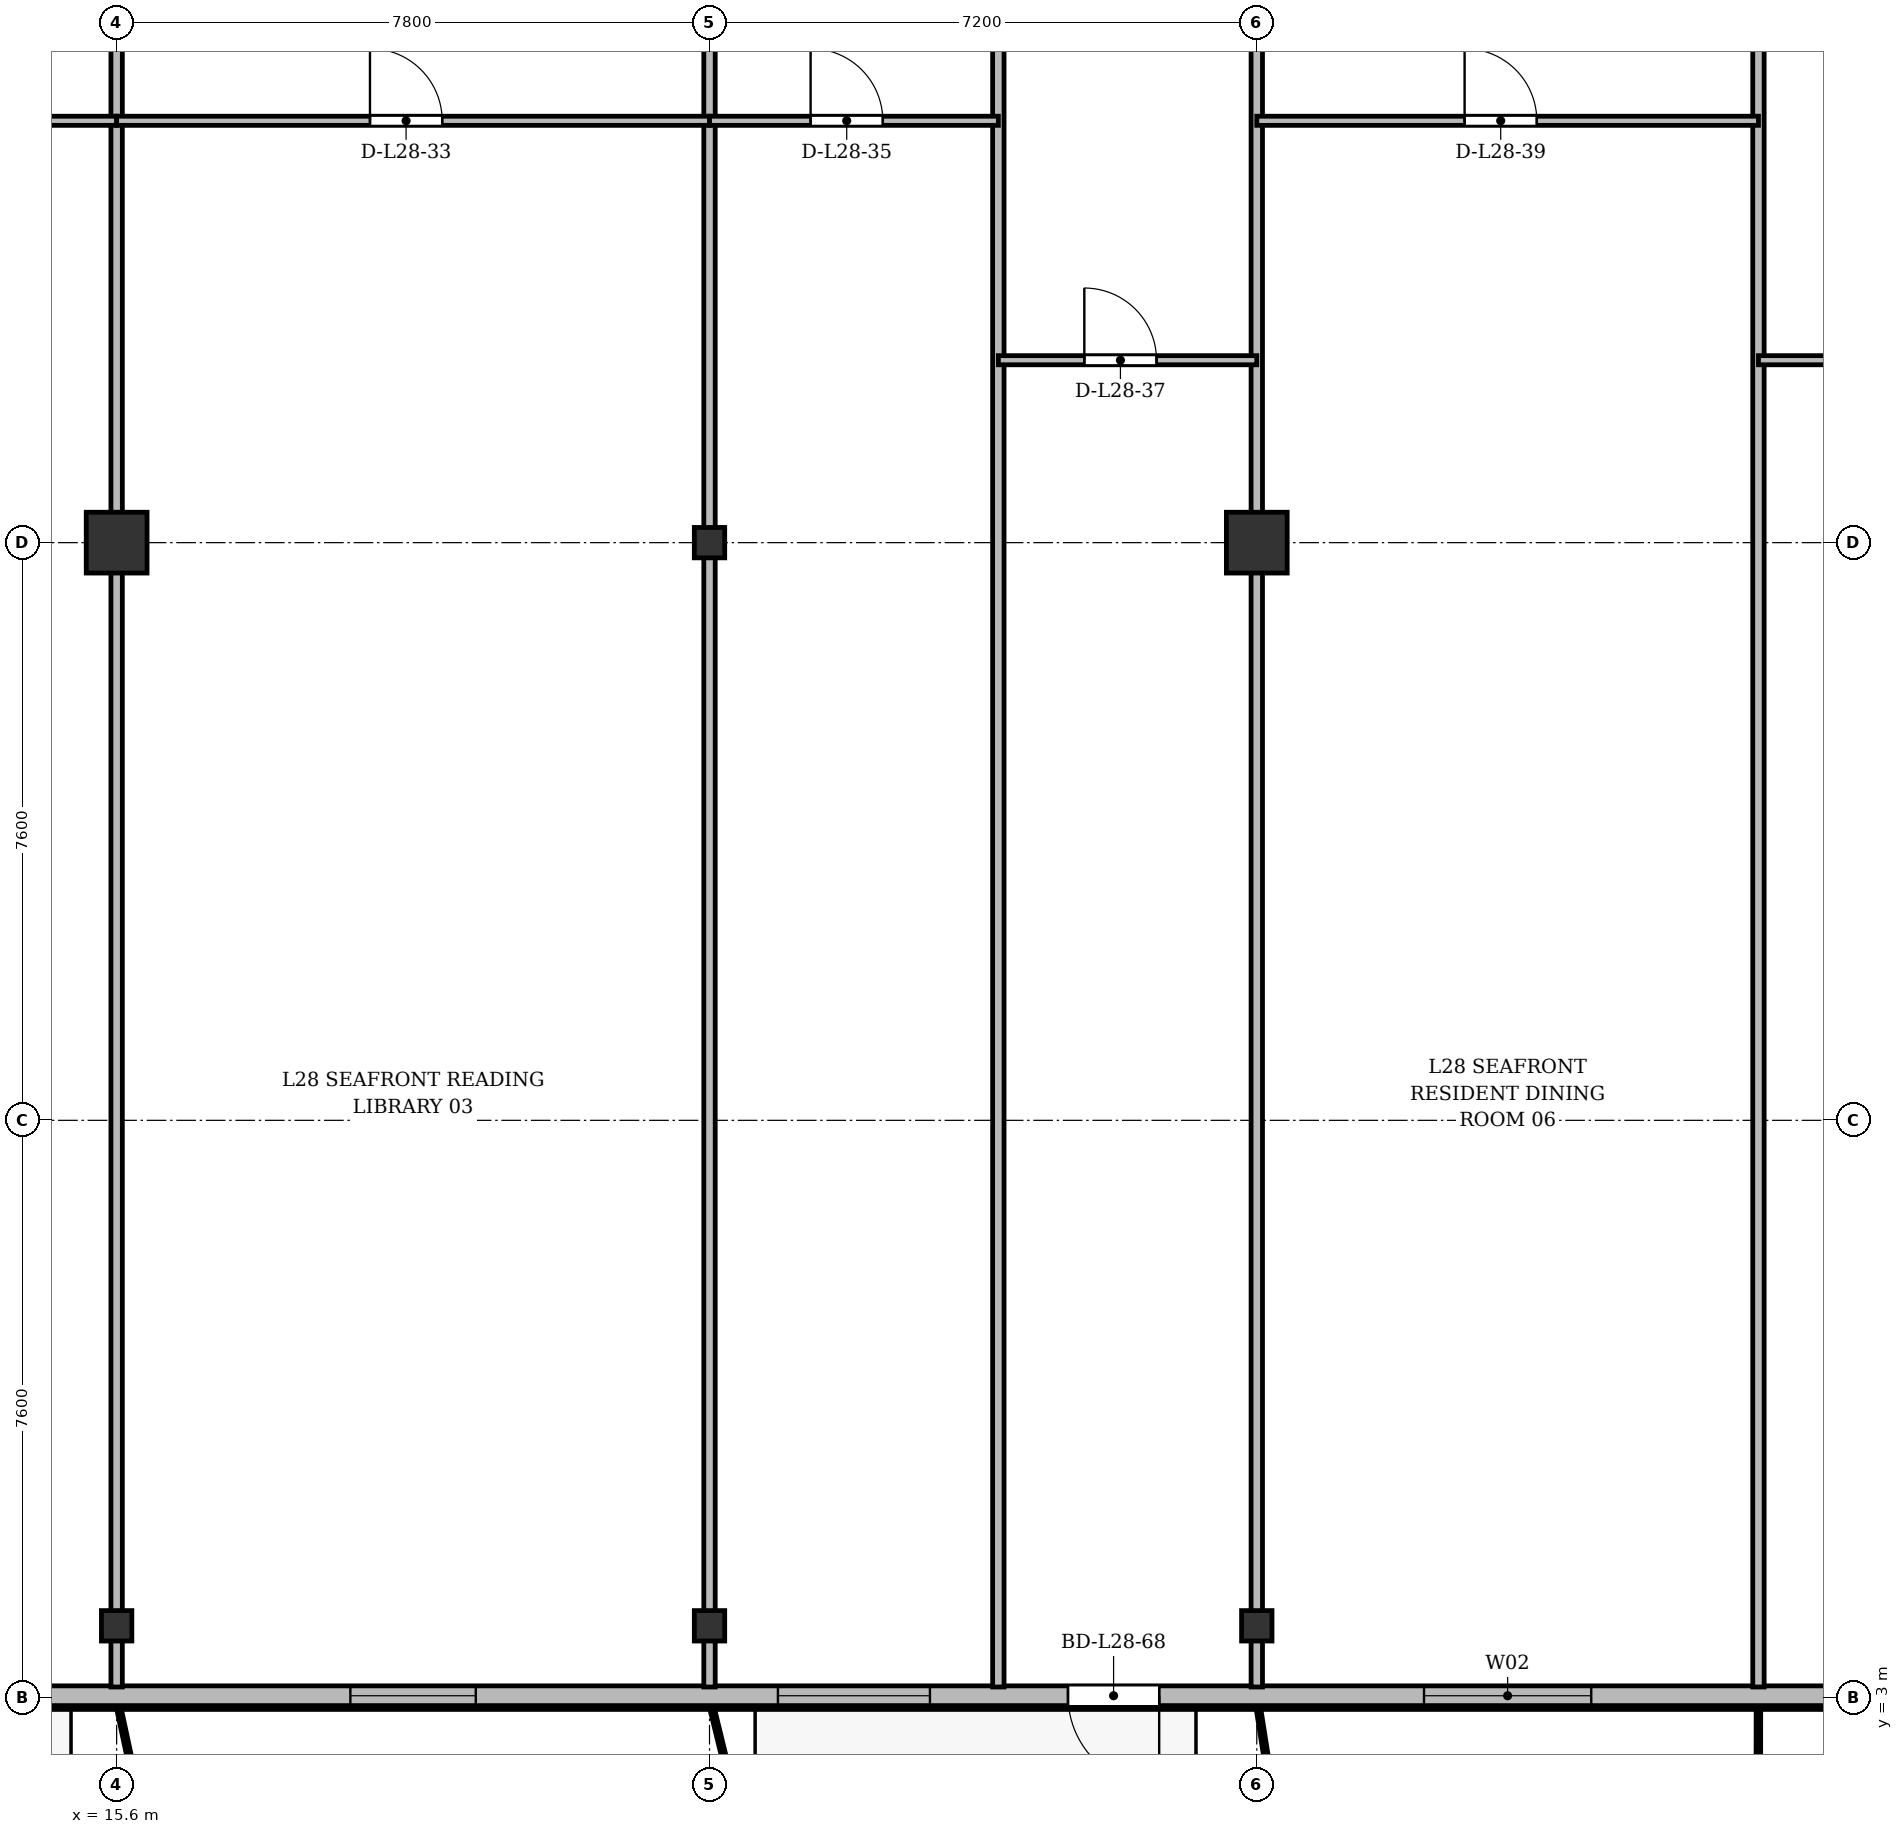
"""IFC4 building model, lengths in metres.
Left out: names, types, materials, properties, quantities, classifications, styles, units other than length and angle.
Written with IfcOpenShell. Run it as: python <this file> out.ifc"""

import sys

from ifc_helpers import new_model, si_unit, direction, frame, frame_2d, origin, origin_2d, place, context, subcontext, project, spatial, rectangle, i_section, extrude, source, transform, mapped, element, fill, save


model = new_model("IFC4")
c1 = context("Model", 3, precision=1e-05, world=origin(), true_north=direction((0.0, 1.0)))
c2 = subcontext(c1, "Body", "Model", "MODEL_VIEW")
j1 = project(units=[si_unit("LENGTHUNIT", "METRE"), si_unit("PLANEANGLEUNIT", "RADIAN")], contexts=[c1])
p1 = place(None, origin())
s1 = spatial("IfcSite", under=j1, at=p1, CompositionType="ELEMENT")
p2 = place(p1, origin())
s2 = spatial("IfcBuilding", under=s1, at=p2, CompositionType="ELEMENT")
p3 = place(p2, frame((0.0, 0.0, 110.5)))
s3 = spatial("IfcBuildingStorey", under=s2, at=p3, CompositionType="ELEMENT", Elevation=110.5)
m1 = source(origin(), c2, "Body", "SweptSolid", [
    extrude(i_section(OverallWidth=0.4, OverallDepth=0.4, WebThickness=0.022, FlangeThickness=0.035, at=origin_2d()), origin(), (0.0, 0.0, 1.0), 3.6),
])
p4 = place(p3, frame((15.6, 3.95, 0.0), z_axis=(0.0, 0.0, 1.0), x_axis=(1.0, 0.0, 0.0)))
e1 = element("IfcColumn", 1, at=p4, inside=s3, PredefinedType="COLUMN", context=c2, shape_type="MappedRepresentation", body=[
    mapped(m1, transform((0.0, 0.0, 0.0), x_axis=(1.0, 0.0, 0.0), y_axis=(0.0, 1.0, 0.0), z_axis=(0.0, 0.0, 1.0), scale=1.0)),
])
m2 = source(origin(), c2, "Body", "SweptSolid", [
    extrude(rectangle(XDim=0.8, YDim=0.8, at=origin_2d()), origin(), (0.0, 0.0, 1.0), 3.6),
])
p5 = place(p3, frame((15.6, 18.2, 0.0), z_axis=(0.0, 0.0, 1.0), x_axis=(1.0, 0.0, 0.0)))
e2 = element("IfcColumn", 2, at=p5, inside=s3, PredefinedType="COLUMN", context=c2, shape_type="MappedRepresentation", body=[
    mapped(m2, transform((0.0, 0.0, 0.0), x_axis=(1.0, 0.0, 0.0), y_axis=(0.0, 1.0, 0.0), z_axis=(0.0, 0.0, 1.0), scale=1.0)),
])
for number, where, z_axis, x_axis in (
    (3, (23.4, 3.95, 0.0), (0.0, 0.0, 1.0), (1.0, 0.0, 0.0)),
    (4, (23.4, 18.2, 0.0), (0.0, 0.0, 1.0), (1.0, 0.0, 0.0)),
    (5, (30.6, 3.95, 0.0), (0.0, 0.0, 1.0), (1.0, 0.0, 0.0)),
):
    element("IfcColumn", number, at=place(p3, frame(where, z_axis=z_axis, x_axis=x_axis)), inside=s3, PredefinedType="COLUMN", context=c2, shape_type="MappedRepresentation", body=[
        mapped(m1, transform((0.0, 0.0, 0.0), x_axis=(1.0, 0.0, 0.0), y_axis=(0.0, 1.0, 0.0), z_axis=(0.0, 0.0, 1.0), scale=1.0)),
    ])
p6 = place(p3, frame((30.6, 18.2, 0.0), z_axis=(0.0, 0.0, 1.0), x_axis=(1.0, 0.0, 0.0)))
e6 = element("IfcColumn", 6, at=p6, inside=s3, PredefinedType="COLUMN", context=c2, shape_type="MappedRepresentation", body=[
    mapped(m2, transform((0.0, 0.0, 0.0), x_axis=(1.0, 0.0, 0.0), y_axis=(0.0, 1.0, 0.0), z_axis=(0.0, 0.0, 1.0), scale=1.0)),
])
p7 = place(p3, frame((66.9, 3.03, 0.0), z_axis=(0.0, 0.0, 1.0), x_axis=(-1.0, 0.0, 0.0)))
e7 = element("IfcWall", 7, at=p7, inside=s3, PredefinedType="SOLIDWALL", context=c2, shape_type="SweptSolid", body=[
    extrude(rectangle(XDim=59.4, YDim=0.26, at=frame_2d((29.7, 0.0))), origin(), (0.0, 0.0, 1.0), 3.34),
])
p8 = place(p7, frame((2.175, 0.0, 0.9)))
e8 = element("IfcOpeningElement", 8, at=p8, cuts=e7, PredefinedType="OPENING", context=c2, shape_type="SweptSolid", body=[
    extrude(rectangle(XDim=1.65, YDim=1.85, at=frame_2d((0.825, 0.925))), frame((0.0, 0.14, 0.0), z_axis=(0.0, -1.0, 0.0), x_axis=(1.0, 0.0, 0.0)), (0.0, 0.0, 1.0), 0.28),
])
p9 = place(p7, frame((5.5, 0.0, 0.9)))
e9 = element("IfcOpeningElement", 9, at=p9, cuts=e7, PredefinedType="OPENING", context=c2, shape_type="SweptSolid", body=[
    extrude(rectangle(XDim=1.8, YDim=1.8, at=frame_2d((0.9, 0.9))), frame((0.0, 0.14, 0.0), z_axis=(0.0, -1.0, 0.0), x_axis=(1.0, 0.0, 0.0)), (0.0, 0.0, 1.0), 0.28),
])
p10 = place(p7, frame((9.213, 0.0, 0.0)))
e10 = element("IfcOpeningElement", 10, at=p10, cuts=e7, PredefinedType="OPENING", context=c2, shape_type="SweptSolid", body=[
    extrude(rectangle(XDim=1.2, YDim=2.2, at=frame_2d((0.6, 1.1))), frame((0.0, 0.14, 0.0), z_axis=(0.0, -1.0, 0.0), x_axis=(1.0, 0.0, 0.0)), (0.0, 0.0, 1.0), 0.28),
])
p11 = place(p7, frame((13.15, 0.0, 0.9)))
e11 = element("IfcOpeningElement", 11, at=p11, cuts=e7, PredefinedType="OPENING", context=c2, shape_type="SweptSolid", body=[
    extrude(rectangle(XDim=1.5, YDim=1.75, at=frame_2d((0.75, 0.875))), frame((0.0, 0.14, 0.0), z_axis=(0.0, -1.0, 0.0), x_axis=(1.0, 0.0, 0.0)), (0.0, 0.0, 1.0), 0.28),
])
p12 = place(p7, frame((16.7, 0.0, 0.9)))
e12 = element("IfcOpeningElement", 12, at=p12, cuts=e7, PredefinedType="OPENING", context=c2, shape_type="SweptSolid", body=[
    extrude(rectangle(XDim=2.0, YDim=1.95, at=frame_2d((1.0, 0.975))), frame((0.0, 0.14, 0.0), z_axis=(0.0, -1.0, 0.0), x_axis=(1.0, 0.0, 0.0)), (0.0, 0.0, 1.0), 0.28),
])
p13 = place(p7, frame((20.475, 0.0, 0.9)))
e13 = element("IfcOpeningElement", 13, at=p13, cuts=e7, PredefinedType="OPENING", context=c2, shape_type="SweptSolid", body=[
    extrude(rectangle(XDim=1.65, YDim=1.85, at=frame_2d((0.825, 0.925))), frame((0.0, 0.14, 0.0), z_axis=(0.0, -1.0, 0.0), x_axis=(1.0, 0.0, 0.0)), (0.0, 0.0, 1.0), 0.28),
])
p14 = place(p7, frame((25.5, 0.0, 0.9)))
e14 = element("IfcOpeningElement", 14, at=p14, cuts=e7, PredefinedType="OPENING", context=c2, shape_type="SweptSolid", body=[
    extrude(rectangle(XDim=1.8, YDim=1.8, at=frame_2d((0.9, 0.9))), frame((0.0, 0.14, 0.0), z_axis=(0.0, -1.0, 0.0), x_axis=(1.0, 0.0, 0.0)), (0.0, 0.0, 1.0), 0.28),
])
p15 = place(p7, frame((31.9, 0.0, 0.9)))
e15 = element("IfcOpeningElement", 15, at=p15, cuts=e7, PredefinedType="OPENING", context=c2, shape_type="SweptSolid", body=[
    extrude(rectangle(XDim=2.2, YDim=1.8, at=frame_2d((1.1, 0.9))), frame((0.0, 0.14, 0.0), z_axis=(0.0, -1.0, 0.0), x_axis=(1.0, 0.0, 0.0)), (0.0, 0.0, 1.0), 0.28),
])
p16 = place(p7, frame((37.584, 0.0, 0.0)))
e16 = element("IfcOpeningElement", 16, at=p16, cuts=e7, PredefinedType="OPENING", context=c2, shape_type="SweptSolid", body=[
    extrude(rectangle(XDim=1.2, YDim=2.2, at=frame_2d((0.6, 1.1))), frame((0.0, 0.14, 0.0), z_axis=(0.0, -1.0, 0.0), x_axis=(1.0, 0.0, 0.0)), (0.0, 0.0, 1.0), 0.28),
])
p17 = place(p7, frame((40.6, 0.0, 0.9)))
e17 = element("IfcOpeningElement", 17, at=p17, cuts=e7, PredefinedType="OPENING", context=c2, shape_type="SweptSolid", body=[
    extrude(rectangle(XDim=2.0, YDim=1.95, at=frame_2d((1.0, 0.975))), frame((0.0, 0.14, 0.0), z_axis=(0.0, -1.0, 0.0), x_axis=(1.0, 0.0, 0.0)), (0.0, 0.0, 1.0), 0.28),
])
p18 = place(p7, frame((46.575, 0.0, 0.9)))
e18 = element("IfcOpeningElement", 18, at=p18, cuts=e7, PredefinedType="OPENING", context=c2, shape_type="SweptSolid", body=[
    extrude(rectangle(XDim=1.65, YDim=1.85, at=frame_2d((0.825, 0.925))), frame((0.0, 0.14, 0.0), z_axis=(0.0, -1.0, 0.0), x_axis=(1.0, 0.0, 0.0)), (0.0, 0.0, 1.0), 0.28),
])
p19 = place(p7, frame((55.817, 0.0, 0.0)))
e19 = element("IfcOpeningElement", 19, at=p19, cuts=e7, PredefinedType="OPENING", context=c2, shape_type="SweptSolid", body=[
    extrude(rectangle(XDim=1.2, YDim=2.2, at=frame_2d((0.6, 1.1))), frame((0.0, 0.14, 0.0), z_axis=(0.0, -1.0, 0.0), x_axis=(1.0, 0.0, 0.0)), (0.0, 0.0, 1.0), 0.28),
])
for number, where, z_axis, x_axis in (
    (20, (15.6, 3.145, 0.0), (0.0, 0.0, 1.0), (0.0, 1.0, 0.0)),
    (21, (23.4, 3.145, 0.0), (0.0, 0.0, 1.0), (0.0, 1.0, 0.0)),
):
    element("IfcWall", number, at=place(p3, frame(where, z_axis=z_axis, x_axis=x_axis)), inside=s3, PredefinedType="PARTITIONING", context=c2, shape_type="SweptSolid", body=[
        extrude(rectangle(XDim=24.455, YDim=0.15, at=frame_2d((12.228, 0.0))), origin(), (0.0, 0.0, 1.0), 2.84),
    ])
p20 = place(p3, frame((27.2, 3.145, 0.0), z_axis=(0.0, 0.0, 1.0), x_axis=(0.0, 1.0, 0.0)))
e22 = element("IfcWall", 22, at=p20, inside=s3, PredefinedType="PARTITIONING", context=c2, shape_type="SweptSolid", body=[
    extrude(rectangle(XDim=24.455, YDim=0.15, at=frame_2d((12.228, 0.0))), origin(), (0.0, 0.0, 1.0), 2.752),
])
p21 = place(p3, frame((30.6, 3.145, 0.0), z_axis=(0.0, 0.0, 1.0), x_axis=(0.0, 1.0, 0.0)))
e23 = element("IfcWall", 23, at=p21, inside=s3, PredefinedType="PARTITIONING", context=c2, shape_type="SweptSolid", body=[
    extrude(rectangle(XDim=24.455, YDim=0.15, at=frame_2d((12.228, 0.0))), origin(), (0.0, 0.0, 1.0), 2.84),
])
p22 = place(p3, frame((37.2, 3.145, 0.0), z_axis=(0.0, 0.0, 1.0), x_axis=(0.0, 1.0, 0.0)))
e24 = element("IfcWall", 24, at=p22, inside=s3, PredefinedType="PARTITIONING", context=c2, shape_type="SweptSolid", body=[
    extrude(rectangle(XDim=24.455, YDim=0.15, at=frame_2d((12.228, 0.0))), origin(), (0.0, 0.0, 1.0), 2.752),
])
p23 = place(p3, frame((8.8, 23.75, 0.0), z_axis=(0.0, 0.0, 1.0), x_axis=(1.0, 0.0, 0.0)))
e25 = element("IfcWall", 25, at=p23, inside=s3, PredefinedType="PARTITIONING", context=c2, shape_type="SweptSolid", body=[
    extrude(rectangle(XDim=6.8, YDim=0.12, at=frame_2d((3.4, 0.0))), origin(), (0.0, 0.0, 1.0), 2.84),
])
p24 = place(p23, frame((2.925, 0.0, 0.0)))
e26 = element("IfcOpeningElement", 26, at=p24, cuts=e25, PredefinedType="OPENING", context=c2, shape_type="SweptSolid", body=[
    extrude(rectangle(XDim=0.95, YDim=2.15, at=frame_2d((0.475, 1.075))), frame((0.0, 0.07, 0.0), z_axis=(0.0, -1.0, 0.0), x_axis=(1.0, 0.0, 0.0)), (0.0, 0.0, 1.0), 0.14),
])
p25 = place(p3, frame((15.6, 23.75, 0.0), z_axis=(0.0, 0.0, 1.0), x_axis=(1.0, 0.0, 0.0)))
e27 = element("IfcWall", 27, at=p25, inside=s3, PredefinedType="PARTITIONING", context=c2, shape_type="SweptSolid", body=[
    extrude(rectangle(XDim=7.8, YDim=0.12, at=frame_2d((3.9, 0.0))), origin(), (0.0, 0.0, 1.0), 2.84),
])
p26 = place(p25, frame((3.333, 0.0, 0.0)))
e28 = element("IfcOpeningElement", 28, at=p26, cuts=e27, PredefinedType="OPENING", context=c2, shape_type="SweptSolid", body=[
    extrude(rectangle(XDim=0.95, YDim=2.15, at=frame_2d((0.475, 1.075))), frame((0.0, 0.07, 0.0), z_axis=(0.0, -1.0, 0.0), x_axis=(1.0, 0.0, 0.0)), (0.0, 0.0, 1.0), 0.14),
])
p27 = place(p3, frame((23.4, 23.75, 0.0), z_axis=(0.0, 0.0, 1.0), x_axis=(1.0, 0.0, 0.0)))
e29 = element("IfcWall", 29, at=p27, inside=s3, PredefinedType="PARTITIONING", context=c2, shape_type="SweptSolid", body=[
    extrude(rectangle(XDim=3.8, YDim=0.12, at=frame_2d((1.9, 0.0))), origin(), (0.0, 0.0, 1.0), 2.84),
])
p28 = place(p27, frame((1.33, 0.0, 0.0)))
e30 = element("IfcOpeningElement", 30, at=p28, cuts=e29, PredefinedType="OPENING", context=c2, shape_type="SweptSolid", body=[
    extrude(rectangle(XDim=0.95, YDim=2.15, at=frame_2d((0.475, 1.075))), frame((0.0, 0.07, 0.0), z_axis=(0.0, -1.0, 0.0), x_axis=(1.0, 0.0, 0.0)), (0.0, 0.0, 1.0), 0.14),
])
p29 = place(p3, frame((27.2, 20.6, 0.0), z_axis=(0.0, 0.0, 1.0), x_axis=(1.0, 0.0, 0.0)))
e31 = element("IfcWall", 31, at=p29, inside=s3, PredefinedType="PARTITIONING", context=c2, shape_type="SweptSolid", body=[
    extrude(rectangle(XDim=3.4, YDim=0.12, at=frame_2d((1.7, 0.0))), origin(), (0.0, 0.0, 1.0), 2.84),
])
p30 = place(p29, frame((1.131, 0.0, 0.0)))
e32 = element("IfcOpeningElement", 32, at=p30, cuts=e31, PredefinedType="OPENING", context=c2, shape_type="SweptSolid", body=[
    extrude(rectangle(XDim=0.95, YDim=2.15, at=frame_2d((0.475, 1.075))), frame((0.0, 0.07, 0.0), z_axis=(0.0, -1.0, 0.0), x_axis=(1.0, 0.0, 0.0)), (0.0, 0.0, 1.0), 0.14),
])
p31 = place(p3, frame((30.6, 23.75, 0.0), z_axis=(0.0, 0.0, 1.0), x_axis=(1.0, 0.0, 0.0)))
e33 = element("IfcWall", 33, at=p31, inside=s3, PredefinedType="PARTITIONING", context=c2, shape_type="SweptSolid", body=[
    extrude(rectangle(XDim=6.6, YDim=0.12, at=frame_2d((3.3, 0.0))), origin(), (0.0, 0.0, 1.0), 2.84),
])
p32 = place(p31, frame((2.734, 0.0, 0.0)))
e34 = element("IfcOpeningElement", 34, at=p32, cuts=e33, PredefinedType="OPENING", context=c2, shape_type="SweptSolid", body=[
    extrude(rectangle(XDim=0.95, YDim=2.15, at=frame_2d((0.475, 1.075))), frame((0.0, 0.07, 0.0), z_axis=(0.0, -1.0, 0.0), x_axis=(1.0, 0.0, 0.0)), (0.0, 0.0, 1.0), 0.14),
])
p33 = place(p3, frame((37.2, 20.6, 0.0), z_axis=(0.0, 0.0, 1.0), x_axis=(1.0, 0.0, 0.0)))
e35 = element("IfcWall", 35, at=p33, inside=s3, PredefinedType="PARTITIONING", context=c2, shape_type="SweptSolid", body=[
    extrude(rectangle(XDim=6.6, YDim=0.12, at=frame_2d((3.3, 0.0))), origin(), (0.0, 0.0, 1.0), 2.84),
])
p34 = place(p33, frame((2.734, 0.0, 0.0)))
e36 = element("IfcOpeningElement", 36, at=p34, cuts=e35, PredefinedType="OPENING", context=c2, shape_type="SweptSolid", body=[
    extrude(rectangle(XDim=0.95, YDim=2.15, at=frame_2d((0.475, 1.075))), frame((0.0, 0.07, 0.0), z_axis=(0.0, -1.0, 0.0), x_axis=(1.0, 0.0, 0.0)), (0.0, 0.0, 1.0), 0.14),
])
m3 = source(origin(), c2, "Body", "SweptSolid", [
    extrude(rectangle(XDim=2.2, YDim=1.8, at=frame_2d((1.1, 0.9))), frame((0.0, 0.03, 0.0), z_axis=(0.0, -1.0, 0.0), x_axis=(1.0, 0.0, 0.0)), (0.0, 0.0, 1.0), 0.06),
])
p35 = place(p15, origin())
e37 = element("IfcWindow", 37, at=p35, inside=s3, PartitioningType="SINGLE_PANEL", PredefinedType="WINDOW", context=c2, shape_type="MappedRepresentation", body=[
    mapped(m3, transform((0.0, 0.0, 0.0), x_axis=(1.0, 0.0, 0.0), y_axis=(0.0, 1.0, 0.0), z_axis=(0.0, 0.0, 1.0), scale=1.0)),
])
fill(e15, e37)
m4 = source(origin(), c2, "Body", "SweptSolid", [
    extrude(rectangle(XDim=1.2, YDim=2.2, at=frame_2d((0.6, 1.1))), frame((0.0, 0.025, 0.0), z_axis=(0.0, -1.0, 0.0), x_axis=(1.0, 0.0, 0.0)), (0.0, 0.0, 1.0), 0.05),
])
p36 = place(p16, origin())
e38 = element("IfcDoor", 38, at=p36, inside=s3, OperationType="SINGLE_SWING_LEFT", PredefinedType="DOOR", context=c2, shape_type="MappedRepresentation", body=[
    mapped(m4, transform((0.0, 0.0, 0.0), x_axis=(1.0, 0.0, 0.0), y_axis=(0.0, 1.0, 0.0), z_axis=(0.0, 0.0, 1.0), scale=1.0)),
])
fill(e16, e38)
m5 = source(origin(), c2, "Body", "SweptSolid", [
    extrude(rectangle(XDim=2.0, YDim=1.95, at=frame_2d((1.0, 0.975))), frame((0.0, 0.03, 0.0), z_axis=(0.0, -1.0, 0.0), x_axis=(1.0, 0.0, 0.0)), (0.0, 0.0, 1.0), 0.06),
])
p37 = place(p17, origin())
e39 = element("IfcWindow", 39, at=p37, inside=s3, PartitioningType="SINGLE_PANEL", PredefinedType="WINDOW", context=c2, shape_type="MappedRepresentation", body=[
    mapped(m5, transform((0.0, 0.0, 0.0), x_axis=(1.0, 0.0, 0.0), y_axis=(0.0, 1.0, 0.0), z_axis=(0.0, 0.0, 1.0), scale=1.0)),
])
fill(e17, e39)
m6 = source(origin(), c2, "Body", "SweptSolid", [
    extrude(rectangle(XDim=1.65, YDim=1.85, at=frame_2d((0.825, 0.925))), frame((0.0, 0.03, 0.0), z_axis=(0.0, -1.0, 0.0), x_axis=(1.0, 0.0, 0.0)), (0.0, 0.0, 1.0), 0.06),
])
p38 = place(p18, origin())
e40 = element("IfcWindow", 40, at=p38, inside=s3, PartitioningType="SINGLE_PANEL", PredefinedType="WINDOW", context=c2, shape_type="MappedRepresentation", body=[
    mapped(m6, transform((0.0, 0.0, 0.0), x_axis=(1.0, 0.0, 0.0), y_axis=(0.0, 1.0, 0.0), z_axis=(0.0, 0.0, 1.0), scale=1.0)),
])
fill(e18, e40)
m7 = source(origin(), c2, "Body", "SweptSolid", [
    extrude(rectangle(XDim=0.95, YDim=2.15, at=frame_2d((0.475, 1.075))), frame((0.0, 0.025, 0.0), z_axis=(0.0, -1.0, 0.0), x_axis=(1.0, 0.0, 0.0)), (0.0, 0.0, 1.0), 0.05),
])
p39 = place(p26, origin())
e41 = element("IfcDoor", 41, at=p39, inside=s3, OperationType="SINGLE_SWING_LEFT", PredefinedType="DOOR", context=c2, shape_type="MappedRepresentation", body=[
    mapped(m7, transform((0.0, 0.0, 0.0), x_axis=(1.0, 0.0, 0.0), y_axis=(0.0, 1.0, 0.0), z_axis=(0.0, 0.0, 1.0), scale=1.0)),
])
fill(e28, e41)
p40 = place(p28, origin())
e42 = element("IfcDoor", 42, at=p40, inside=s3, OperationType="SINGLE_SWING_LEFT", PredefinedType="DOOR", context=c2, shape_type="MappedRepresentation", body=[
    mapped(m7, transform((0.0, 0.0, 0.0), x_axis=(1.0, 0.0, 0.0), y_axis=(0.0, 1.0, 0.0), z_axis=(0.0, 0.0, 1.0), scale=1.0)),
])
fill(e30, e42)
p41 = place(p30, origin())
e43 = element("IfcDoor", 43, at=p41, inside=s3, OperationType="SINGLE_SWING_LEFT", PredefinedType="DOOR", context=c2, shape_type="MappedRepresentation", body=[
    mapped(m7, transform((0.0, 0.0, 0.0), x_axis=(1.0, 0.0, 0.0), y_axis=(0.0, 1.0, 0.0), z_axis=(0.0, 0.0, 1.0), scale=1.0)),
])
fill(e32, e43)
p42 = place(p32, origin())
e44 = element("IfcDoor", 44, at=p42, inside=s3, OperationType="SINGLE_SWING_LEFT", PredefinedType="DOOR", context=c2, shape_type="MappedRepresentation", body=[
    mapped(m7, transform((0.0, 0.0, 0.0), x_axis=(1.0, 0.0, 0.0), y_axis=(0.0, 1.0, 0.0), z_axis=(0.0, 0.0, 1.0), scale=1.0)),
])
fill(e34, e44)
save(model, sys.argv[1])
